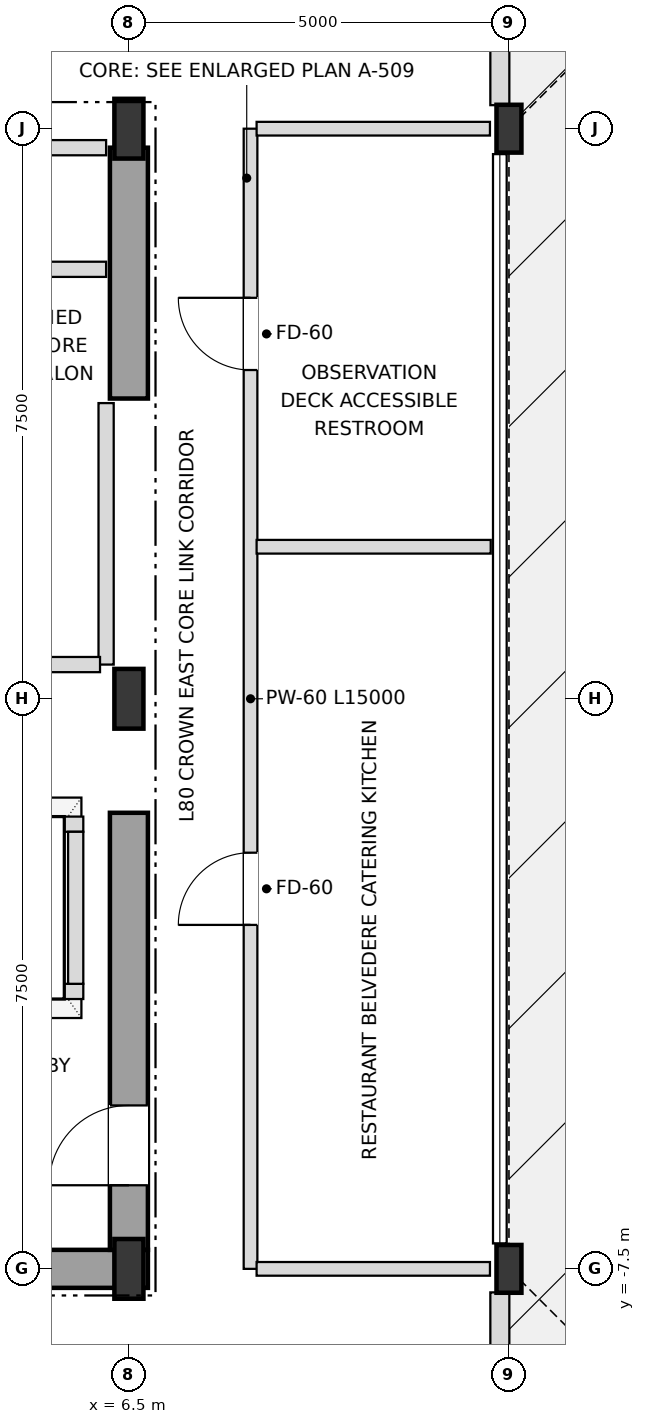
"""IFC4 building model, lengths in metres.
Left out: names, types, materials, properties, quantities, classifications, styles, units other than length and angle.
Written with IfcOpenShell. Run it as: python <this file> out.ifc"""

import sys

from ifc_helpers import new_model, si_unit, direction, frame, frame_2d, origin, origin_2d, place, context, subcontext, project, spatial, rectangle, i_section, extrude, element, fill, save


model = new_model("IFC4")
c1 = context("Model", 3, precision=1e-05, world=origin(), true_north=direction((0.0, 1.0)))
c2 = subcontext(c1, "Body", "Model", "MODEL_VIEW")
j1 = project(units=[si_unit("LENGTHUNIT", "METRE"), si_unit("PLANEANGLEUNIT", "RADIAN")], contexts=[c1])
p1 = place(None, origin())
s1 = spatial("IfcSite", under=j1, at=p1, CompositionType="ELEMENT")
p2 = place(p1, origin())
s2 = spatial("IfcBuilding", under=s1, at=p2, CompositionType="ELEMENT")
p3 = place(p2, frame((0.0, 0.0, 305.1)))
s3 = spatial("IfcBuildingStorey", under=s2, at=p3, CompositionType="ELEMENT", Elevation=305.1)
for number, where, z_axis, x_axis in (
    (1, (6.5, -7.5, 0.0), (0.0, 0.0, 1.0), (1.0, 0.0, 0.0)),
    (2, (6.5, 0.0, 0.0), (0.0, 0.0, 1.0), (1.0, 0.0, 0.0)),
    (3, (6.5, 7.5, 0.0), (0.0, 0.0, 1.0), (1.0, 0.0, 0.0)),
):
    element("IfcColumn", number, at=place(p3, frame(where, z_axis=z_axis, x_axis=x_axis)), inside=s3, PredefinedType="COLUMN", context=c2, shape_type="SweptSolid", body=[
        extrude(i_section(OverallWidth=0.382, OverallDepth=0.786, WebThickness=0.02, FlangeThickness=0.033, at=origin_2d()), origin(), (0.0, 0.0, 1.0), 4.8),
    ])
for number, where, z_axis, x_axis in (
    (4, (11.5, -7.5, 0.0), (0.0, 0.0, 1.0), (1.0, 0.0, 0.0)),
    (5, (11.5, 7.5, 0.0), (0.0, 0.0, 1.0), (1.0, 0.0, 0.0)),
):
    element("IfcColumn", number, at=place(p3, frame(where, z_axis=z_axis, x_axis=x_axis)), inside=s3, PredefinedType="COLUMN", context=c2, shape_type="SweptSolid", body=[
        extrude(i_section(OverallWidth=0.328, OverallDepth=0.629, WebThickness=0.014, FlangeThickness=0.021, at=origin_2d()), origin(), (0.0, 0.0, 1.0), 4.8),
    ])
for number, where, z_axis, x_axis in (
    (6, (11.38, -11.155, 0.0), (0.0, 0.0, 1.0), (0.0, 1.0, 0.0)),
    (7, (11.38, 7.81, 0.0), (0.0, 0.0, 1.0), (0.0, 1.0, 0.0)),
):
    element("IfcWall", number, at=place(p3, frame(where, z_axis=z_axis, x_axis=x_axis)), inside=s3, PredefinedType="SOLIDWALL", context=c2, shape_type="SweptSolid", body=[
        extrude(rectangle(XDim=3.345, YDim=0.25, at=frame_2d((1.673, 0.0))), origin(), (0.0, 0.0, 1.0), 4.55),
    ])
p4 = place(p3, frame((0.0, -7.5, 0.0), z_axis=(0.0, 0.0, 1.0), x_axis=(1.0, 0.0, 0.0)))
e8 = element("IfcWall", 8, at=p4, inside=s3, PredefinedType="SHEAR", context=c2, shape_type="SweptSolid", body=[
    extrude(rectangle(XDim=6.75, YDim=0.5, at=frame_2d((3.375, 0.0))), origin(), (0.0, 0.0, 1.0), 4.55),
])
p5 = place(p3, frame((6.5, -7.25, 0.0), z_axis=(0.0, 0.0, 1.0), x_axis=(0.0, 1.0, 0.0)))
e9 = element("IfcWall", 9, at=p5, inside=s3, PredefinedType="SHEAR", context=c2, shape_type="SweptSolid", body=[
    extrude(rectangle(XDim=5.75, YDim=0.5, at=frame_2d((2.875, 0.0))), origin(), (0.0, 0.0, 1.0), 4.55),
])
p6 = place(p5, frame((0.85, 0.0, 0.0)))
e10 = element("IfcOpeningElement", 10, at=p6, cuts=e9, PredefinedType="OPENING", context=c2, shape_type="SweptSolid", body=[
    extrude(rectangle(XDim=1.05, YDim=2.15, at=frame_2d((0.525, 1.075))), frame((0.0, 0.26, 0.0), z_axis=(0.0, -1.0, 0.0), x_axis=(1.0, 0.0, 0.0)), (0.0, 0.0, 1.0), 0.52),
])
p7 = place(p3, frame((6.5, 3.95, 0.0), z_axis=(0.0, 0.0, 1.0), x_axis=(0.0, 1.0, 0.0)))
e11 = element("IfcWall", 11, at=p7, inside=s3, PredefinedType="SHEAR", context=c2, shape_type="SweptSolid", body=[
    extrude(rectangle(XDim=3.3, YDim=0.5, at=frame_2d((1.65, 0.0))), origin(), (0.0, 0.0, 1.0), 4.55),
])
p8 = place(p3, frame((1.8, -3.85, 0.0), z_axis=(0.0, 0.0, 1.0), x_axis=(1.0, 0.0, 0.0)))
e12 = element("IfcWall", 12, at=p8, inside=s3, PredefinedType="SOLIDWALL", context=c2, shape_type="SweptSolid", body=[
    extrude(rectangle(XDim=4.1, YDim=0.2, at=frame_2d((2.05, 0.0))), origin(), (0.0, 0.0, 1.0), 4.55),
])
p9 = place(p8, frame((0.45, 0.0, 0.0)))
e13 = element("IfcOpeningElement", 13, at=p9, cuts=e12, PredefinedType="OPENING", context=c2, shape_type="SweptSolid", body=[
    extrude(rectangle(XDim=1.2, YDim=2.2, at=frame_2d((0.6, 1.1))), frame((0.0, 0.11, 0.0), z_axis=(0.0, -1.0, 0.0), x_axis=(1.0, 0.0, 0.0)), (0.0, 0.0, 1.0), 0.22),
])
p10 = place(p8, frame((2.45, 0.0, 0.0)))
e14 = element("IfcOpeningElement", 14, at=p10, cuts=e12, PredefinedType="OPENING", context=c2, shape_type="SweptSolid", body=[
    extrude(rectangle(XDim=1.2, YDim=2.2, at=frame_2d((0.6, 1.1))), frame((0.0, 0.11, 0.0), z_axis=(0.0, -1.0, 0.0), x_axis=(1.0, 0.0, 0.0)), (0.0, 0.0, 1.0), 0.22),
])
p11 = place(p3, frame((1.8, -1.65, 0.0), z_axis=(0.0, 0.0, 1.0), x_axis=(1.0, 0.0, 0.0)))
e15 = element("IfcWall", 15, at=p11, inside=s3, PredefinedType="SOLIDWALL", context=c2, shape_type="SweptSolid", body=[
    extrude(rectangle(XDim=4.1, YDim=0.2, at=frame_2d((2.05, 0.0))), origin(), (0.0, 0.0, 1.0), 4.55),
])
p12 = place(p3, frame((5.8, -3.75, 0.0), z_axis=(0.0, 0.0, 1.0), x_axis=(0.0, 1.0, 0.0)))
e16 = element("IfcWall", 16, at=p12, inside=s3, PredefinedType="SOLIDWALL", context=c2, shape_type="SweptSolid", body=[
    extrude(rectangle(XDim=2.0, YDim=0.2, at=frame_2d((1.0, 0.0))), origin(), (0.0, 0.0, 1.0), 4.55),
])
p13 = place(p3, frame((6.2, 0.45, 0.0), z_axis=(0.0, 0.0, 1.0), x_axis=(0.0, 1.0, 0.0)))
e17 = element("IfcWall", 17, at=p13, inside=s3, PredefinedType="SOLIDWALL", context=c2, shape_type="SweptSolid", body=[
    extrude(rectangle(XDim=3.44, YDim=0.2, at=frame_2d((1.72, 0.0))), origin(), (0.0, 0.0, 1.0), 4.55),
])
p14 = place(p3, frame((8.1, -7.5, 0.0), z_axis=(0.0, 0.0, 1.0), x_axis=(0.0, 1.0, 0.0)))
e18 = element("IfcWall", 18, at=p14, inside=s3, PredefinedType="PARTITIONING", context=c2, shape_type="SweptSolid", body=[
    extrude(rectangle(XDim=15.0, YDim=0.18, at=frame_2d((7.5, 0.0))), origin(), (0.0, 0.0, 1.0), 4.55),
])
p15 = place(p14, frame((4.525, 0.0, 0.0)))
e19 = element("IfcOpeningElement", 19, at=p15, cuts=e18, PredefinedType="OPENING", context=c2, shape_type="SweptSolid", body=[
    extrude(rectangle(XDim=0.95, YDim=2.15, at=frame_2d((0.475, 1.075))), frame((0.0, 0.1, 0.0), z_axis=(0.0, -1.0, 0.0), x_axis=(1.0, 0.0, 0.0)), (0.0, 0.0, 1.0), 0.2),
])
p16 = place(p14, frame((11.825, 0.0, 0.0)))
e20 = element("IfcOpeningElement", 20, at=p16, cuts=e18, PredefinedType="OPENING", context=c2, shape_type="SweptSolid", body=[
    extrude(rectangle(XDim=0.95, YDim=2.15, at=frame_2d((0.475, 1.075))), frame((0.0, 0.1, 0.0), z_axis=(0.0, -1.0, 0.0), x_axis=(1.0, 0.0, 0.0)), (0.0, 0.0, 1.0), 0.2),
])
p17 = place(p3, frame((8.18, -7.5, 0.0), z_axis=(0.0, 0.0, 1.0), x_axis=(1.0, 0.0, 0.0)))
e21 = element("IfcWall", 21, at=p17, inside=s3, PredefinedType="PARTITIONING", context=c2, shape_type="SweptSolid", body=[
    extrude(rectangle(XDim=3.07, YDim=0.18, at=frame_2d((1.535, 0.0))), origin(), (0.0, 0.0, 1.0), 4.218),
])
p18 = place(p3, frame((4.13, 0.45, 0.0), z_axis=(0.0, 0.0, 1.0), x_axis=(1.0, 0.0, 0.0)))
e22 = element("IfcWall", 22, at=p18, inside=s3, PredefinedType="SOLIDWALL", context=c2, shape_type="SweptSolid", body=[
    extrude(rectangle(XDim=1.99, YDim=0.2, at=frame_2d((0.995, 0.0))), origin(), (0.0, 0.0, 1.0), 4.55),
])
p19 = place(p3, frame((8.18, 2.0, 0.0), z_axis=(0.0, 0.0, 1.0), x_axis=(1.0, 0.0, 0.0)))
e23 = element("IfcWall", 23, at=p19, inside=s3, PredefinedType="PARTITIONING", context=c2, shape_type="SweptSolid", body=[
    extrude(rectangle(XDim=3.08, YDim=0.18, at=frame_2d((1.54, 0.0))), origin(), (0.0, 0.0, 1.0), 4.55),
])
for number, where, z_axis, x_axis in (
    (24, (4.13, 5.65, 0.0), (0.0, 0.0, 1.0), (1.0, 0.0, 0.0)),
    (25, (4.13, 7.25, 0.0), (0.0, 0.0, 1.0), (1.0, 0.0, 0.0)),
):
    element("IfcWall", number, at=place(p3, frame(where, z_axis=z_axis, x_axis=x_axis)), inside=s3, PredefinedType="SOLIDWALL", context=c2, shape_type="SweptSolid", body=[
        extrude(rectangle(XDim=2.07, YDim=0.2, at=frame_2d((1.035, 0.0))), origin(), (0.0, 0.0, 1.0), 4.55),
    ])
p20 = place(p3, frame((8.18, 7.5, 0.0), z_axis=(0.0, 0.0, 1.0), x_axis=(1.0, 0.0, 0.0)))
e26 = element("IfcWall", 26, at=p20, inside=s3, PredefinedType="PARTITIONING", context=c2, shape_type="SweptSolid", body=[
    extrude(rectangle(XDim=3.07, YDim=0.18, at=frame_2d((1.535, 0.0))), origin(), (0.0, 0.0, 1.0), 4.218),
])
p21 = place(p6, origin())
e27 = element("IfcDoor", 27, at=p21, inside=s3, OperationType="SINGLE_SWING_LEFT", PredefinedType="DOOR", context=c2, shape_type="SweptSolid", body=[
    extrude(rectangle(XDim=1.05, YDim=2.15, at=frame_2d((0.525, 1.075))), frame((0.0, 0.025, 0.0), z_axis=(0.0, -1.0, 0.0), x_axis=(1.0, 0.0, 0.0)), (0.0, 0.0, 1.0), 0.05),
])
fill(e10, e27)
p22 = place(p15, origin())
e28 = element("IfcDoor", 28, at=p22, inside=s3, OperationType="SINGLE_SWING_LEFT", PredefinedType="DOOR", context=c2, shape_type="SweptSolid", body=[
    extrude(rectangle(XDim=0.95, YDim=2.15, at=frame_2d((0.475, 1.075))), frame((0.0, 0.025, 0.0), z_axis=(0.0, -1.0, 0.0), x_axis=(1.0, 0.0, 0.0)), (0.0, 0.0, 1.0), 0.05),
])
fill(e19, e28)
p23 = place(p16, origin())
e29 = element("IfcDoor", 29, at=p23, inside=s3, OperationType="SINGLE_SWING_RIGHT", PredefinedType="DOOR", context=c2, shape_type="SweptSolid", body=[
    extrude(rectangle(XDim=0.95, YDim=2.15, at=frame_2d((0.475, 1.075))), frame((0.0, 0.025, 0.0), z_axis=(0.0, -1.0, 0.0), x_axis=(1.0, 0.0, 0.0)), (0.0, 0.0, 1.0), 0.05),
])
fill(e20, e29)
save(model, sys.argv[1])
